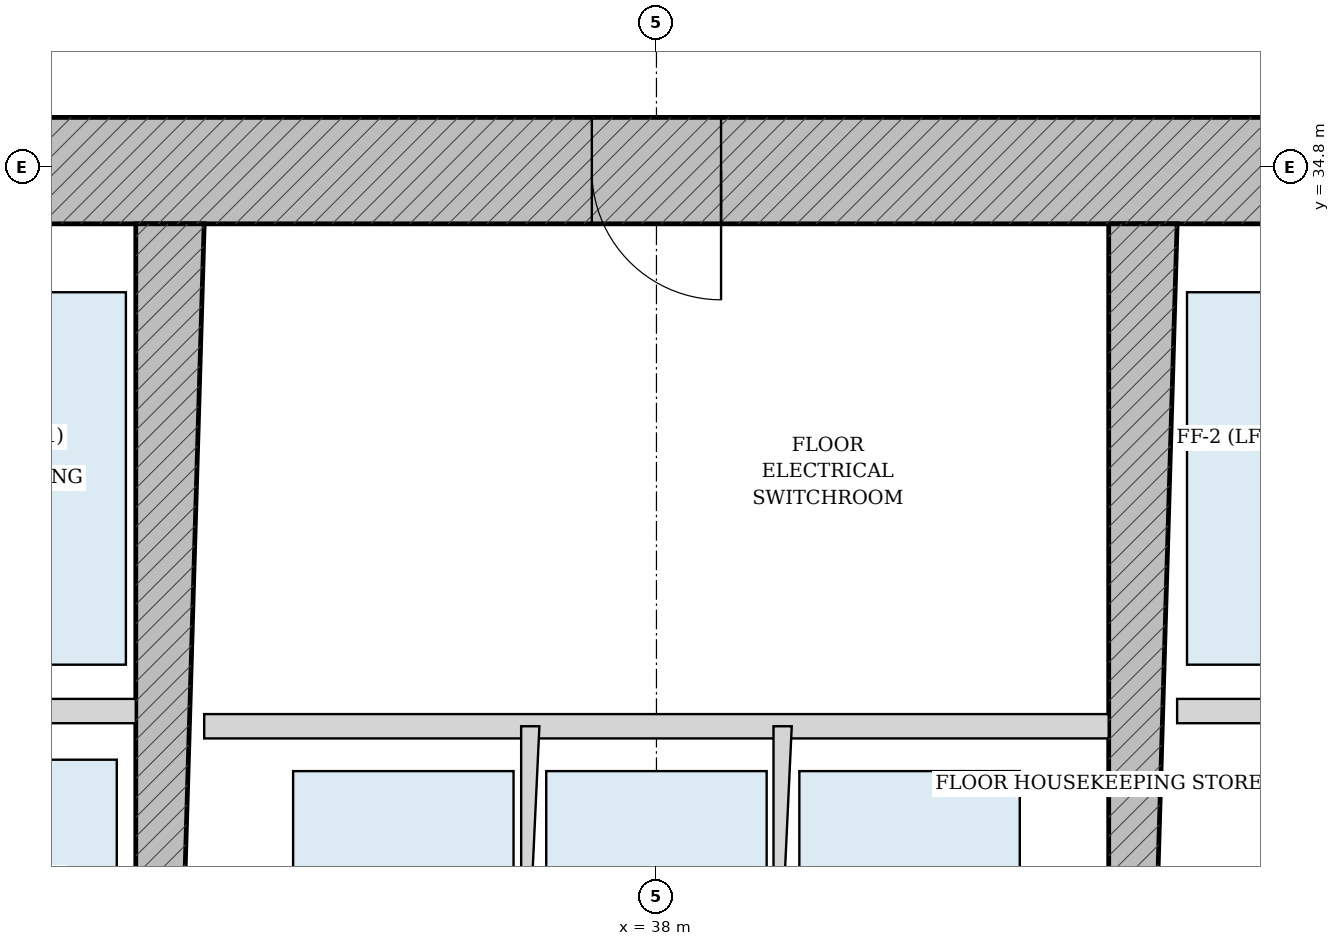
"""IFC4 building model, lengths in metres.
Left out: names, types, materials, properties, quantities, classifications, styles, units other than length and angle.
Written with IfcOpenShell. Run it as: python <this file> out.ifc"""

import sys

from ifc_helpers import new_model, si_unit, direction, frame, frame_2d, origin, place, context, subcontext, project, spatial, rectangle, extrude, source, transform, mapped, element, fill, save


model = new_model("IFC4")
c1 = context("Model", 3, precision=1e-05, world=origin(), true_north=direction((-0.2419218956, 0.970295726276)))
c2 = subcontext(c1, "Body", "Model", "MODEL_VIEW")
j1 = project(units=[si_unit("LENGTHUNIT", "METRE"), si_unit("PLANEANGLEUNIT", "RADIAN")], contexts=[c1])
p1 = place(None, origin())
s1 = spatial("IfcSite", under=j1, at=p1, CompositionType="ELEMENT")
p2 = place(p1, origin())
s2 = spatial("IfcBuilding", under=s1, at=p2, CompositionType="ELEMENT")
p3 = place(p2, frame((0.0, 0.0, 74.4)))
s3 = spatial("IfcBuildingStorey", under=s2, at=p3, CompositionType="ELEMENT", Elevation=74.4)
p4 = place(p3, frame((28.675, 34.775, 0.0), z_axis=(0.0, 0.0, 1.0), x_axis=(1.0, 0.0, 0.0)))
e1 = element("IfcWall", 1, at=p4, inside=s3, PredefinedType="SHEAR", context=c2, shape_type="SweptSolid", body=[
    extrude(rectangle(XDim=18.65, YDim=0.7, at=frame_2d((9.325, 0.0))), origin(), (0.0, 0.0, 1.0), 5.125),
])
p5 = place(p4, frame((8.9, 0.0, 0.0)))
e2 = element("IfcOpeningElement", 2, at=p5, cuts=e1, PredefinedType="OPENING", context=c2, shape_type="SweptSolid", body=[
    extrude(rectangle(XDim=0.85, YDim=2.1, at=frame_2d((0.425, 1.05))), frame((0.0, 0.36, 0.0), z_axis=(0.0, -1.0, 0.0), x_axis=(1.0, 0.0, 0.0)), (0.0, 0.0, 1.0), 0.72),
])
p6 = place(p3, frame((34.8, 19.175, 0.0), z_axis=(0.0, 0.0, 1.0), x_axis=(0.0, 1.0, 0.0)))
e3 = element("IfcWall", 3, at=p6, inside=s3, PredefinedType="SHEAR", context=c2, shape_type="SweptSolid", body=[
    extrude(rectangle(XDim=15.25, YDim=0.45, at=frame_2d((7.625, 0.0))), origin(), (0.0, 0.0, 1.0), 5.125),
])
p7 = place(p6, frame((7.8, 0.0, 0.0)))
e4 = element("IfcOpeningElement", 4, at=p7, cuts=e3, PredefinedType="OPENING", context=c2, shape_type="SweptSolid", body=[
    extrude(rectangle(XDim=1.05, YDim=2.15, at=frame_2d((0.525, 1.075))), frame((0.0, 0.235, 0.0), z_axis=(0.0, -1.0, 0.0), x_axis=(1.0, 0.0, 0.0)), (0.0, 0.0, 1.0), 0.47),
])
p8 = place(p3, frame((41.2, 19.175, 0.0), z_axis=(0.0, 0.0, 1.0), x_axis=(0.0, 1.0, 0.0)))
e5 = element("IfcWall", 5, at=p8, inside=s3, PredefinedType="SHEAR", context=c2, shape_type="SweptSolid", body=[
    extrude(rectangle(XDim=15.25, YDim=0.45, at=frame_2d((7.625, 0.0))), origin(), (0.0, 0.0, 1.0), 5.125),
])
p9 = place(p8, frame((7.8, 0.0, 0.0)))
e6 = element("IfcOpeningElement", 6, at=p9, cuts=e5, PredefinedType="OPENING", context=c2, shape_type="SweptSolid", body=[
    extrude(rectangle(XDim=1.05, YDim=2.15, at=frame_2d((0.525, 1.075))), frame((0.0, 0.235, 0.0), z_axis=(0.0, -1.0, 0.0), x_axis=(1.0, 0.0, 0.0)), (0.0, 0.0, 1.0), 0.47),
])
for number, where, z_axis, x_axis in (
    (7, (32.86, 31.22, 0.0), (0.0, 0.0, 1.0), (1.0, 0.0, 0.0)),
    (8, (41.425, 31.22, 0.0), (0.0, 0.0, 1.0), (1.0, 0.0, 0.0)),
):
    element("IfcWall", number, at=place(p3, frame(where, z_axis=z_axis, x_axis=x_axis)), inside=s3, PredefinedType="PARTITIONING", context=c2, shape_type="SweptSolid", body=[
        extrude(rectangle(XDim=1.715, YDim=0.16, at=frame_2d((0.857, 0.0))), origin(), (0.0, 0.0, 1.0), 5.125),
    ])
p10 = place(p3, frame((35.025, 31.12, 0.0), z_axis=(0.0, 0.0, 1.0), x_axis=(1.0, 0.0, 0.0)))
e9 = element("IfcWall", 9, at=p10, inside=s3, PredefinedType="PARTITIONING", context=c2, shape_type="SweptSolid", body=[
    extrude(rectangle(XDim=5.95, YDim=0.16, at=frame_2d((2.975, 0.0))), origin(), (0.0, 0.0, 1.0), 5.125),
])
for number, where, z_axis, x_axis in (
    (10, (37.17, 28.56, 0.0), (0.0, 0.0, 1.0), (0.0, 1.0, 0.0)),
    (11, (38.83, 28.56, 0.0), (0.0, 0.0, 1.0), (0.0, 1.0, 0.0)),
):
    element("IfcWall", number, at=place(p3, frame(where, z_axis=z_axis, x_axis=x_axis)), inside=s3, PredefinedType="PARTITIONING", context=c2, shape_type="SweptSolid", body=[
        extrude(rectangle(XDim=2.56, YDim=0.12, at=frame_2d((1.28, 0.0))), origin(), (0.0, 0.0, 1.0), 5.125),
    ])
m1 = source(origin(), c2, "Body", "SweptSolid", [
    extrude(rectangle(XDim=0.85, YDim=2.1, at=frame_2d((0.425, 1.05))), frame((0.0, 0.025, 0.0), z_axis=(0.0, -1.0, 0.0), x_axis=(1.0, 0.0, 0.0)), (0.0, 0.0, 1.0), 0.05),
])
p11 = place(p5, frame((0.85, 0.0, 0.0), z_axis=(0.0, 0.0, 1.0), x_axis=(-1.0, 0.0, 0.0)))
e12 = element("IfcDoor", 12, at=p11, inside=s3, OperationType="SINGLE_SWING_LEFT", PredefinedType="DOOR", context=c2, shape_type="MappedRepresentation", body=[
    mapped(m1, transform((0.0, 0.0, 0.0), scale=1.0)),
])
fill(e2, e12)
save(model, sys.argv[1])
